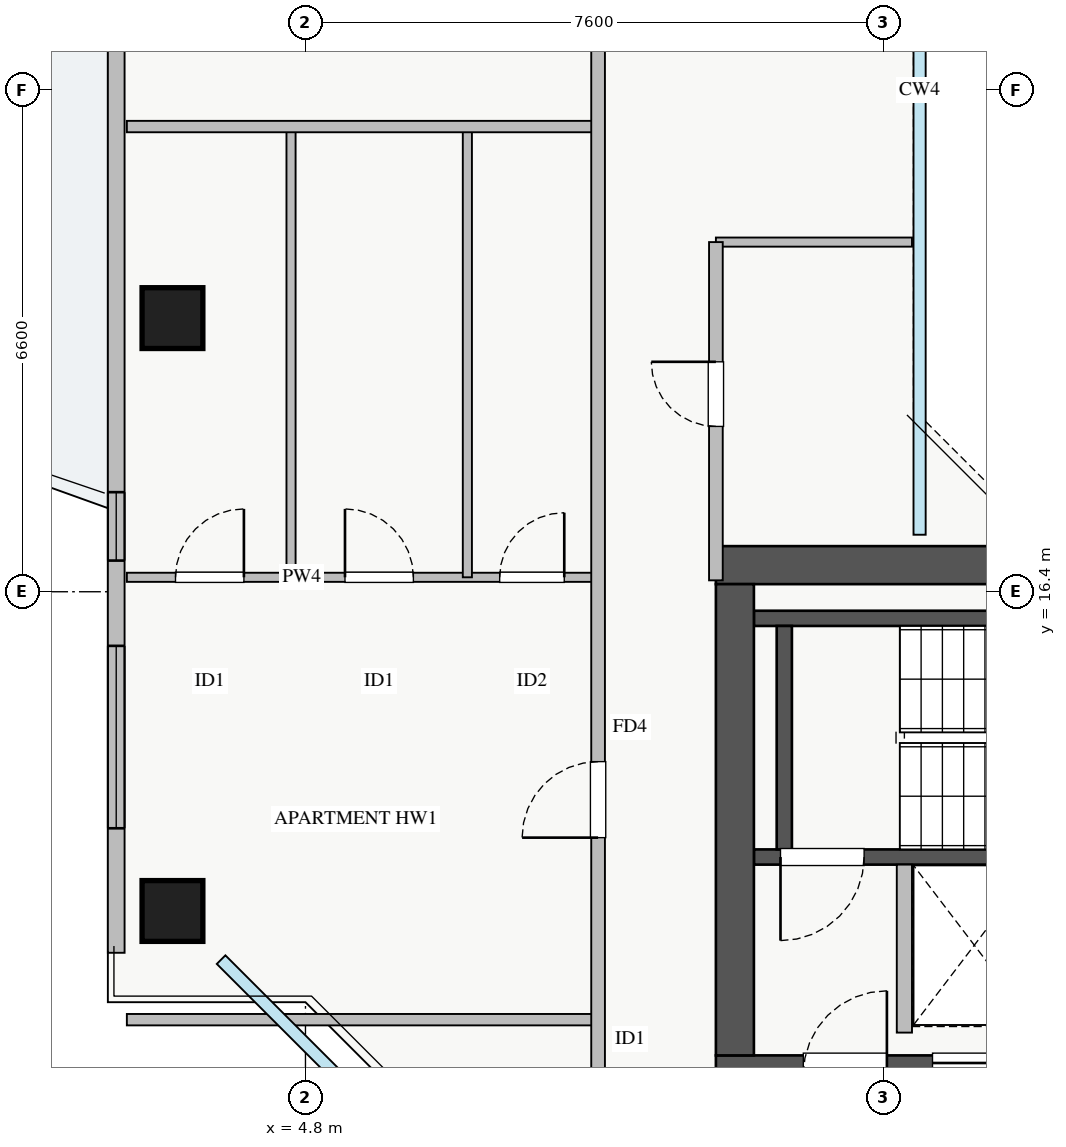
"""IFC4 building model, lengths in metres.
Left out: names, types, materials, properties, quantities, classifications, styles, units other than length and angle.
Written with IfcOpenShell. Run it as: python <this file> out.ifc"""

import sys

from ifc_helpers import new_model, si_unit, direction, frame, frame_2d, origin, origin_2d, place, context, subcontext, project, spatial, rectangle, extrude, source, transform, mapped, element, fill, save


model = new_model("IFC4")
c1 = context("Model", 3, precision=1e-05, world=origin(), true_north=direction((0.0, 1.0)))
c2 = subcontext(c1, "Body", "Model", "MODEL_VIEW")
j1 = project(units=[si_unit("LENGTHUNIT", "METRE"), si_unit("PLANEANGLEUNIT", "RADIAN")], contexts=[c1])
p1 = place(None, origin())
s1 = spatial("IfcSite", under=j1, at=p1, CompositionType="ELEMENT")
p2 = place(p1, origin())
s2 = spatial("IfcBuilding", under=s1, at=p2, CompositionType="ELEMENT")
p3 = place(p2, frame((0.0, 0.0, 197.0)))
s3 = spatial("IfcBuildingStorey", under=s2, at=p3, CompositionType="ELEMENT", Elevation=197.0)
p4 = place(p3, frame((12.68, 12.8, 0.0), z_axis=(0.0, 0.0, 1.0), x_axis=(1.0, 0.0, 0.0)))
e1 = element("IfcWall", 1, at=p4, inside=s3, PredefinedType="SHEAR", context=c2, shape_type="SweptSolid", body=[
    extrude(rectangle(XDim=1.94, YDim=0.18, at=frame_2d((0.97, 0.0))), origin(), (0.0, 0.0, 1.0), 3.07),
])
p5 = place(p3, frame((10.7, 12.91, 0.0), z_axis=(0.0, 0.0, 1.0), x_axis=(1.0, 0.0, 0.0)))
e2 = element("IfcWall", 2, at=p5, inside=s3, PredefinedType="SHEAR", context=c2, shape_type="SweptSolid", body=[
    extrude(rectangle(XDim=7.45, YDim=0.2, at=frame_2d((3.725, 0.0))), origin(), (0.0, 0.0, 1.0), 3.25),
])
p6 = place(p5, frame((0.35, 0.0, 0.0)))
e3 = element("IfcOpeningElement", 3, at=p6, cuts=e2, PredefinedType="OPENING", context=c2, shape_type="SweptSolid", body=[
    extrude(rectangle(XDim=1.1, YDim=2.05, at=frame_2d((0.55, 1.025))), frame((0.0, 0.11, 0.0), z_axis=(0.0, -1.0, 0.0), x_axis=(1.0, 0.0, 0.0)), (0.0, 0.0, 1.0), 0.22),
])
p7 = place(p3, frame((10.7, 16.05, 0.0), z_axis=(0.0, 0.0, 1.0), x_axis=(1.0, 0.0, 0.0)))
e4 = element("IfcWall", 4, at=p7, inside=s3, PredefinedType="SHEAR", context=c2, shape_type="SweptSolid", body=[
    extrude(rectangle(XDim=7.45, YDim=0.2, at=frame_2d((3.725, 0.0))), origin(), (0.0, 0.0, 1.0), 3.25),
])
p8 = place(p3, frame((11.1, 13.01, 0.0), z_axis=(0.0, 0.0, 1.0), x_axis=(0.0, 1.0, 0.0)))
e5 = element("IfcWall", 5, at=p8, inside=s3, PredefinedType="SHEAR", context=c2, shape_type="SweptSolid", body=[
    extrude(rectangle(XDim=2.94, YDim=0.2, at=frame_2d((1.47, 0.0))), origin(), (0.0, 0.0, 1.0), 3.25),
])
p9 = place(p3, frame((10.2, 10.05, 0.0), z_axis=(0.0, 0.0, 1.0), x_axis=(1.0, 0.0, 0.0)))
e6 = element("IfcWall", 6, at=p9, inside=s3, PredefinedType="SHEAR", context=c2, shape_type="SweptSolid", body=[
    extrude(rectangle(XDim=17.6, YDim=0.5, at=frame_2d((8.8, 0.0))), origin(), (0.0, 0.0, 1.0), 3.25),
])
p10 = place(p9, frame((1.15, 0.0, 0.0)))
e7 = element("IfcOpeningElement", 7, at=p10, cuts=e6, PredefinedType="OPENING", context=c2, shape_type="SweptSolid", body=[
    extrude(rectangle(XDim=1.1, YDim=2.05, at=frame_2d((0.55, 1.025))), frame((0.0, 0.26, 0.0), z_axis=(0.0, -1.0, 0.0), x_axis=(1.0, 0.0, 0.0)), (0.0, 0.0, 1.0), 0.52),
])
p11 = place(p9, frame((8.3, 0.0, 0.0)))
e8 = element("IfcOpeningElement", 8, at=p11, cuts=e6, PredefinedType="OPENING", context=c2, shape_type="SweptSolid", body=[
    extrude(rectangle(XDim=1.1, YDim=2.05, at=frame_2d((0.55, 1.025))), frame((0.0, 0.26, 0.0), z_axis=(0.0, -1.0, 0.0), x_axis=(1.0, 0.0, 0.0)), (0.0, 0.0, 1.0), 0.52),
])
p12 = place(p9, frame((2.85, 0.0, 0.0)))
e9 = element("IfcOpeningElement", 9, at=p12, cuts=e6, PredefinedType="OPENING", context=c2, shape_type="SweptSolid", body=[
    extrude(rectangle(XDim=1.1, YDim=2.05, at=frame_2d((0.55, 1.025))), frame((0.0, 0.26, 0.0), z_axis=(0.0, -1.0, 0.0), x_axis=(1.0, 0.0, 0.0)), (0.0, 0.0, 1.0), 0.52),
])
p13 = place(p9, frame((5.8, 0.0, 0.0)))
e10 = element("IfcOpeningElement", 10, at=p13, cuts=e6, PredefinedType="OPENING", context=c2, shape_type="SweptSolid", body=[
    extrude(rectangle(XDim=1.0, YDim=2.05, at=frame_2d((0.5, 1.025))), frame((0.0, 0.26, 0.0), z_axis=(0.0, -1.0, 0.0), x_axis=(1.0, 0.0, 0.0)), (0.0, 0.0, 1.0), 0.52),
])
p14 = place(p9, frame((14.74, 0.0, 0.0)))
e11 = element("IfcOpeningElement", 11, at=p14, cuts=e6, PredefinedType="OPENING", context=c2, shape_type="SweptSolid", body=[
    extrude(rectangle(XDim=1.0, YDim=2.05, at=frame_2d((0.5, 1.025))), frame((0.0, 0.26, 0.0), z_axis=(0.0, -1.0, 0.0), x_axis=(1.0, 0.0, 0.0)), (0.0, 0.0, 1.0), 0.52),
])
p15 = place(p9, frame((11.67, 0.0, 0.0)))
e12 = element("IfcOpeningElement", 12, at=p15, cuts=e6, PredefinedType="OPENING", context=c2, shape_type="SweptSolid", body=[
    extrude(rectangle(XDim=1.0, YDim=2.05, at=frame_2d((0.5, 1.025))), frame((0.0, 0.26, 0.0), z_axis=(0.0, -1.0, 0.0), x_axis=(1.0, 0.0, 0.0)), (0.0, 0.0, 1.0), 0.52),
])
p16 = place(p3, frame((10.2, 16.75, 0.0), z_axis=(0.0, 0.0, 1.0), x_axis=(1.0, 0.0, 0.0)))
e13 = element("IfcWall", 13, at=p16, inside=s3, PredefinedType="SHEAR", context=c2, shape_type="SweptSolid", body=[
    extrude(rectangle(XDim=17.6, YDim=0.5, at=frame_2d((8.8, 0.0))), origin(), (0.0, 0.0, 1.0), 3.25),
])
p17 = place(p3, frame((10.45, 10.3, 0.0), z_axis=(0.0, 0.0, 1.0), x_axis=(0.0, 1.0, 0.0)))
e14 = element("IfcWall", 14, at=p17, inside=s3, PredefinedType="SHEAR", context=c2, shape_type="SweptSolid", body=[
    extrude(rectangle(XDim=6.2, YDim=0.5, at=frame_2d((3.1, 0.0))), origin(), (0.0, 0.0, 1.0), 3.25),
])
m1 = source(origin(), c2, "Body", "SweptSolid", [
    extrude(rectangle(XDim=0.8, YDim=0.8, at=origin_2d()), origin(), (0.0, 0.0, 1.0), 3.25),
])
for number, where, z_axis, x_axis in (
    (15, (3.05, 20.0, 0.0), (0.0, 0.0, 1.0), (1.0, 0.0, 0.0)),
    (16, (3.05, 12.2, 0.0), (0.0, 0.0, 1.0), (1.0, 0.0, 0.0)),
):
    element("IfcColumn", number, at=place(p3, frame(where, z_axis=z_axis, x_axis=x_axis)), inside=s3, PredefinedType="COLUMN", context=c2, shape_type="MappedRepresentation", body=[
        mapped(m1, transform((0.0, 0.0, 0.0), x_axis=(1.0, 0.0, 0.0), y_axis=(0.0, 1.0, 0.0), z_axis=(0.0, 0.0, 1.0), scale=1.0)),
    ])
p18 = place(p3, frame((2.31, 11.65, 0.0), z_axis=(0.0, 0.0, 1.0), x_axis=(0.0, 1.0, 0.0)))
e17 = element("IfcWall", 17, at=p18, inside=s3, PredefinedType="STANDARD", context=c2, shape_type="SweptSolid", body=[
    extrude(rectangle(XDim=22.7, YDim=0.22, at=frame_2d((11.35, 0.0))), origin(), (0.0, 0.0, 1.0), 2.61),
])
p19 = place(p18, frame((12.2, 0.0, 0.0)))
e18 = element("IfcOpeningElement", 18, at=p19, cuts=e17, PredefinedType="OPENING", context=c2, shape_type="SweptSolid", body=[
    extrude(rectangle(XDim=1.2, YDim=2.1, at=frame_2d((0.6, 1.05))), frame((0.0, 0.12, 0.0), z_axis=(0.0, -1.0, 0.0), x_axis=(1.0, 0.0, 0.0)), (0.0, 0.0, 1.0), 0.24),
])
p20 = place(p18, frame((1.638, 0.0, 0.9)))
e19 = element("IfcOpeningElement", 19, at=p20, cuts=e17, PredefinedType="OPENING", context=c2, shape_type="SweptSolid", body=[
    extrude(rectangle(XDim=2.4, YDim=1.48, at=frame_2d((1.2, 0.74))), frame((0.0, 0.12, 0.0), z_axis=(0.0, -1.0, 0.0), x_axis=(1.0, 0.0, 0.0)), (0.0, 0.0, 1.0), 0.24),
])
p21 = place(p18, frame((18.813, 0.0, 0.9)))
e20 = element("IfcOpeningElement", 20, at=p21, cuts=e17, PredefinedType="OPENING", context=c2, shape_type="SweptSolid", body=[
    extrude(rectangle(XDim=2.1, YDim=1.48, at=frame_2d((1.05, 0.74))), frame((0.0, 0.12, 0.0), z_axis=(0.0, -1.0, 0.0), x_axis=(1.0, 0.0, 0.0)), (0.0, 0.0, 1.0), 0.24),
])
p22 = place(p18, frame((5.16, 0.0, 0.9)))
e21 = element("IfcOpeningElement", 21, at=p22, cuts=e17, PredefinedType="OPENING", context=c2, shape_type="SweptSolid", body=[
    extrude(rectangle(XDim=0.9, YDim=1.2, at=frame_2d((0.45, 0.6))), frame((0.0, 0.12, 0.0), z_axis=(0.0, -1.0, 0.0), x_axis=(1.0, 0.0, 0.0)), (0.0, 0.0, 1.0), 0.24),
])
p23 = place(p18, frame((13.62, 0.0, 0.9)))
e22 = element("IfcOpeningElement", 22, at=p23, cuts=e17, PredefinedType="OPENING", context=c2, shape_type="SweptSolid", body=[
    extrude(rectangle(XDim=0.9, YDim=1.2, at=frame_2d((0.45, 0.6))), frame((0.0, 0.12, 0.0), z_axis=(0.0, -1.0, 0.0), x_axis=(1.0, 0.0, 0.0)), (0.0, 0.0, 1.0), 0.24),
])
p24 = place(p3, frame((12.68, 10.6, 0.0), z_axis=(0.0, 0.0, 1.0), x_axis=(0.0, 1.0, 0.0)))
e23 = element("IfcWall", 23, at=p24, inside=s3, PredefinedType="PARTITIONING", context=c2, shape_type="SweptSolid", body=[
    extrude(rectangle(XDim=2.21, YDim=0.2, at=frame_2d((1.105, 0.0))), origin(), (0.0, 0.0, 1.0), 3.07),
])
p25 = place(p3, frame((2.45, 10.77, 0.0), z_axis=(0.0, 0.0, 1.0), x_axis=(1.0, 0.0, 0.0)))
e24 = element("IfcWall", 24, at=p25, inside=s3, PredefinedType="PARTITIONING", context=c2, shape_type="SweptSolid", body=[
    extrude(rectangle(XDim=6.2, YDim=0.15, at=frame_2d((3.1, 0.0))), origin(), (0.0, 0.0, 1.0), 3.07),
])
p26 = place(p3, frame((2.45, 16.59, 0.0), z_axis=(0.0, 0.0, 1.0), x_axis=(1.0, 0.0, 0.0)))
e25 = element("IfcWall", 25, at=p26, inside=s3, PredefinedType="PLUMBINGWALL", context=c2, shape_type="SweptSolid", body=[
    extrude(rectangle(XDim=6.2, YDim=0.12, at=frame_2d((3.1, 0.0))), origin(), (0.0, 0.0, 1.0), 3.07),
])
p27 = place(p26, frame((0.64, 0.0, 0.0)))
e26 = element("IfcOpeningElement", 26, at=p27, cuts=e25, PredefinedType="OPENING", context=c2, shape_type="SweptSolid", body=[
    extrude(rectangle(XDim=0.9, YDim=2.05, at=frame_2d((0.45, 1.025))), frame((0.0, 0.07, 0.0), z_axis=(0.0, -1.0, 0.0), x_axis=(1.0, 0.0, 0.0)), (0.0, 0.0, 1.0), 0.14),
])
p28 = place(p26, frame((2.87, 0.0, 0.0)))
e27 = element("IfcOpeningElement", 27, at=p28, cuts=e25, PredefinedType="OPENING", context=c2, shape_type="SweptSolid", body=[
    extrude(rectangle(XDim=0.9, YDim=2.05, at=frame_2d((0.45, 1.025))), frame((0.0, 0.07, 0.0), z_axis=(0.0, -1.0, 0.0), x_axis=(1.0, 0.0, 0.0)), (0.0, 0.0, 1.0), 0.14),
])
p29 = place(p26, frame((4.905, 0.0, 0.0)))
e28 = element("IfcOpeningElement", 28, at=p29, cuts=e25, PredefinedType="OPENING", context=c2, shape_type="SweptSolid", body=[
    extrude(rectangle(XDim=0.85, YDim=2.05, at=frame_2d((0.425, 1.025))), frame((0.0, 0.07, 0.0), z_axis=(0.0, -1.0, 0.0), x_axis=(1.0, 0.0, 0.0)), (0.0, 0.0, 1.0), 0.14),
])
for number, where, z_axis, x_axis in (
    (29, (4.61, 16.59, 0.0), (0.0, 0.0, 1.0), (0.0, 1.0, 0.0)),
    (30, (6.93, 16.59, 0.0), (0.0, 0.0, 1.0), (0.0, 1.0, 0.0)),
):
    element("IfcWall", number, at=place(p3, frame(where, z_axis=z_axis, x_axis=x_axis)), inside=s3, PredefinedType="PLUMBINGWALL", context=c2, shape_type="SweptSolid", body=[
        extrude(rectangle(XDim=5.93, YDim=0.12, at=frame_2d((2.965, 0.0))), origin(), (0.0, 0.0, 1.0), 3.07),
    ])
p30 = place(p3, frame((2.45, 22.52, 0.0), z_axis=(0.0, 0.0, 1.0), x_axis=(1.0, 0.0, 0.0)))
e31 = element("IfcWall", 31, at=p30, inside=s3, PredefinedType="PARTITIONING", context=c2, shape_type="SweptSolid", body=[
    extrude(rectangle(XDim=6.2, YDim=0.15, at=frame_2d((3.1, 0.0))), origin(), (0.0, 0.0, 1.0), 3.07),
])
p31 = place(p3, frame((8.65, 6.2, 0.0), z_axis=(0.0, 0.0, 1.0), x_axis=(0.0, 1.0, 0.0)))
e32 = element("IfcWall", 32, at=p31, inside=s3, PredefinedType="PARTITIONING", context=c2, shape_type="SweptSolid", body=[
    extrude(rectangle(XDim=33.6, YDim=0.18, at=frame_2d((16.8, 0.0))), origin(), (0.0, 0.0, 1.0), 3.07),
])
p32 = place(p31, frame((29.605, 0.0, 0.0)))
e33 = element("IfcOpeningElement", 33, at=p32, cuts=e32, PredefinedType="OPENING", context=c2, shape_type="SweptSolid", body=[
    extrude(rectangle(XDim=0.9, YDim=2.05, at=frame_2d((0.45, 1.025))), frame((0.0, 0.1, 0.0), z_axis=(0.0, -1.0, 0.0), x_axis=(1.0, 0.0, 0.0)), (0.0, 0.0, 1.0), 0.2),
])
p33 = place(p31, frame((2.92, 0.0, 0.0)))
e34 = element("IfcOpeningElement", 34, at=p33, cuts=e32, PredefinedType="OPENING", context=c2, shape_type="SweptSolid", body=[
    extrude(rectangle(XDim=0.9, YDim=2.05, at=frame_2d((0.45, 1.025))), frame((0.0, 0.1, 0.0), z_axis=(0.0, -1.0, 0.0), x_axis=(1.0, 0.0, 0.0)), (0.0, 0.0, 1.0), 0.2),
])
p34 = place(p31, frame((6.965, 0.0, 0.0)))
e35 = element("IfcOpeningElement", 35, at=p34, cuts=e32, PredefinedType="OPENING", context=c2, shape_type="SweptSolid", body=[
    extrude(rectangle(XDim=1.0, YDim=2.05, at=frame_2d((0.5, 1.025))), frame((0.0, 0.1, 0.0), z_axis=(0.0, -1.0, 0.0), x_axis=(1.0, 0.0, 0.0)), (0.0, 0.0, 1.0), 0.2),
])
p35 = place(p31, frame((18.595, 0.0, 0.0)))
e36 = element("IfcOpeningElement", 36, at=p35, cuts=e32, PredefinedType="OPENING", context=c2, shape_type="SweptSolid", body=[
    extrude(rectangle(XDim=1.0, YDim=2.05, at=frame_2d((0.5, 1.025))), frame((0.0, 0.1, 0.0), z_axis=(0.0, -1.0, 0.0), x_axis=(1.0, 0.0, 0.0)), (0.0, 0.0, 1.0), 0.2),
])
p36 = place(p3, frame((10.2, 21.0, 0.0), z_axis=(0.0, 0.0, 1.0), x_axis=(1.0, 0.0, 0.0)))
e37 = element("IfcWall", 37, at=p36, inside=s3, PredefinedType="PLUMBINGWALL", context=c2, shape_type="SweptSolid", body=[
    extrude(rectangle(XDim=2.58, YDim=0.12, at=frame_2d((1.29, 0.0))), origin(), (0.0, 0.0, 1.0), 3.07),
])
p37 = place(p3, frame((10.2, 16.55, 0.0), z_axis=(0.0, 0.0, 1.0), x_axis=(0.0, 1.0, 0.0)))
e38 = element("IfcWall", 38, at=p37, inside=s3, PredefinedType="PARTITIONING", context=c2, shape_type="SweptSolid", body=[
    extrude(rectangle(XDim=4.45, YDim=0.18, at=frame_2d((2.225, 0.0))), origin(), (0.0, 0.0, 1.0), 3.07),
])
p38 = place(p37, frame((2.025, 0.0, 0.0)))
e39 = element("IfcOpeningElement", 39, at=p38, cuts=e38, PredefinedType="OPENING", context=c2, shape_type="SweptSolid", body=[
    extrude(rectangle(XDim=0.85, YDim=2.05, at=frame_2d((0.425, 1.025))), frame((0.0, 0.1, 0.0), z_axis=(0.0, -1.0, 0.0), x_axis=(1.0, 0.0, 0.0)), (0.0, 0.0, 1.0), 0.2),
])
m2 = source(origin(), c2, "Body", "SweptSolid", [
    extrude(rectangle(XDim=2.4, YDim=1.48, at=frame_2d((1.2, 0.74))), frame((0.0, 0.03, 0.0), z_axis=(0.0, -1.0, 0.0), x_axis=(1.0, 0.0, 0.0)), (0.0, 0.0, 1.0), 0.06),
])
p39 = place(p20, origin())
e40 = element("IfcWindow", 40, at=p39, inside=s3, PartitioningType="TRIPLE_PANEL_VERTICAL", PredefinedType="WINDOW", context=c2, shape_type="MappedRepresentation", body=[
    mapped(m2, transform((0.0, 0.0, 0.0), x_axis=(1.0, 0.0, 0.0), y_axis=(0.0, 1.0, 0.0), z_axis=(0.0, 0.0, 1.0), scale=1.0)),
])
fill(e19, e40)
m3 = source(origin(), c2, "Body", "SweptSolid", [
    extrude(rectangle(XDim=1.1, YDim=2.05, at=frame_2d((0.55, 1.025))), frame((0.0, 0.025, 0.0), z_axis=(0.0, -1.0, 0.0), x_axis=(1.0, 0.0, 0.0)), (0.0, 0.0, 1.0), 0.05),
])
p40 = place(p6, frame((1.1, 0.0, 0.0), z_axis=(0.0, 0.0, 1.0), x_axis=(-1.0, 0.0, 0.0)))
e41 = element("IfcDoor", 41, at=p40, inside=s3, OperationType="SINGLE_SWING_LEFT", PredefinedType="DOOR", context=c2, shape_type="MappedRepresentation", body=[
    mapped(m3, transform((0.0, 0.0, 0.0), x_axis=(1.0, 0.0, 0.0), y_axis=(0.0, 1.0, 0.0), z_axis=(0.0, 0.0, 1.0), scale=1.0)),
])
fill(e3, e41)
m4 = source(origin(), c2, "Body", "SweptSolid", [
    extrude(rectangle(XDim=0.9, YDim=2.05, at=frame_2d((0.45, 1.025))), frame((0.0, 0.025, 0.0), z_axis=(0.0, -1.0, 0.0), x_axis=(1.0, 0.0, 0.0)), (0.0, 0.0, 1.0), 0.05),
])
p41 = place(p27, origin())
e42 = element("IfcDoor", 42, at=p41, inside=s3, OperationType="SINGLE_SWING_RIGHT", PredefinedType="DOOR", context=c2, shape_type="MappedRepresentation", body=[
    mapped(m4, transform((0.0, 0.0, 0.0), x_axis=(1.0, 0.0, 0.0), y_axis=(0.0, 1.0, 0.0), z_axis=(0.0, 0.0, 1.0), scale=1.0)),
])
fill(e26, e42)
p42 = place(p28, origin())
e43 = element("IfcDoor", 43, at=p42, inside=s3, OperationType="SINGLE_SWING_LEFT", PredefinedType="DOOR", context=c2, shape_type="MappedRepresentation", body=[
    mapped(m4, transform((0.0, 0.0, 0.0), x_axis=(1.0, 0.0, 0.0), y_axis=(0.0, 1.0, 0.0), z_axis=(0.0, 0.0, 1.0), scale=1.0)),
])
fill(e27, e43)
m5 = source(origin(), c2, "Body", "SweptSolid", [
    extrude(rectangle(XDim=0.85, YDim=2.05, at=frame_2d((0.425, 1.025))), frame((0.0, 0.025, 0.0), z_axis=(0.0, -1.0, 0.0), x_axis=(1.0, 0.0, 0.0)), (0.0, 0.0, 1.0), 0.05),
])
p43 = place(p29, origin())
e44 = element("IfcDoor", 44, at=p43, inside=s3, OperationType="SINGLE_SWING_RIGHT", PredefinedType="DOOR", context=c2, shape_type="MappedRepresentation", body=[
    mapped(m5, transform((0.0, 0.0, 0.0), x_axis=(1.0, 0.0, 0.0), y_axis=(0.0, 1.0, 0.0), z_axis=(0.0, 0.0, 1.0), scale=1.0)),
])
fill(e28, e44)
m6 = source(origin(), c2, "Body", "SweptSolid", [
    extrude(rectangle(XDim=1.0, YDim=2.05, at=frame_2d((0.5, 1.025))), frame((0.0, 0.025, 0.0), z_axis=(0.0, -1.0, 0.0), x_axis=(1.0, 0.0, 0.0)), (0.0, 0.0, 1.0), 0.05),
])
p44 = place(p34, origin())
e45 = element("IfcDoor", 45, at=p44, inside=s3, OperationType="SINGLE_SWING_LEFT", PredefinedType="DOOR", context=c2, shape_type="MappedRepresentation", body=[
    mapped(m6, transform((0.0, 0.0, 0.0), x_axis=(1.0, 0.0, 0.0), y_axis=(0.0, 1.0, 0.0), z_axis=(0.0, 0.0, 1.0), scale=1.0)),
])
fill(e35, e45)
p45 = place(p38, origin())
e46 = element("IfcDoor", 46, at=p45, inside=s3, OperationType="SINGLE_SWING_RIGHT", PredefinedType="DOOR", context=c2, shape_type="MappedRepresentation", body=[
    mapped(m5, transform((0.0, 0.0, 0.0), x_axis=(1.0, 0.0, 0.0), y_axis=(0.0, 1.0, 0.0), z_axis=(0.0, 0.0, 1.0), scale=1.0)),
])
fill(e39, e46)
m7 = source(origin(), c2, "Body", "SweptSolid", [
    extrude(rectangle(XDim=0.9, YDim=1.2, at=frame_2d((0.45, 0.6))), frame((0.0, 0.03, 0.0), z_axis=(0.0, -1.0, 0.0), x_axis=(1.0, 0.0, 0.0)), (0.0, 0.0, 1.0), 0.06),
])
p46 = place(p22, origin())
e47 = element("IfcWindow", 47, at=p46, inside=s3, PartitioningType="SINGLE_PANEL", PredefinedType="WINDOW", context=c2, shape_type="MappedRepresentation", body=[
    mapped(m7, transform((0.0, 0.0, 0.0), x_axis=(1.0, 0.0, 0.0), y_axis=(0.0, 1.0, 0.0), z_axis=(0.0, 0.0, 1.0), scale=1.0)),
])
fill(e21, e47)
save(model, sys.argv[1])
